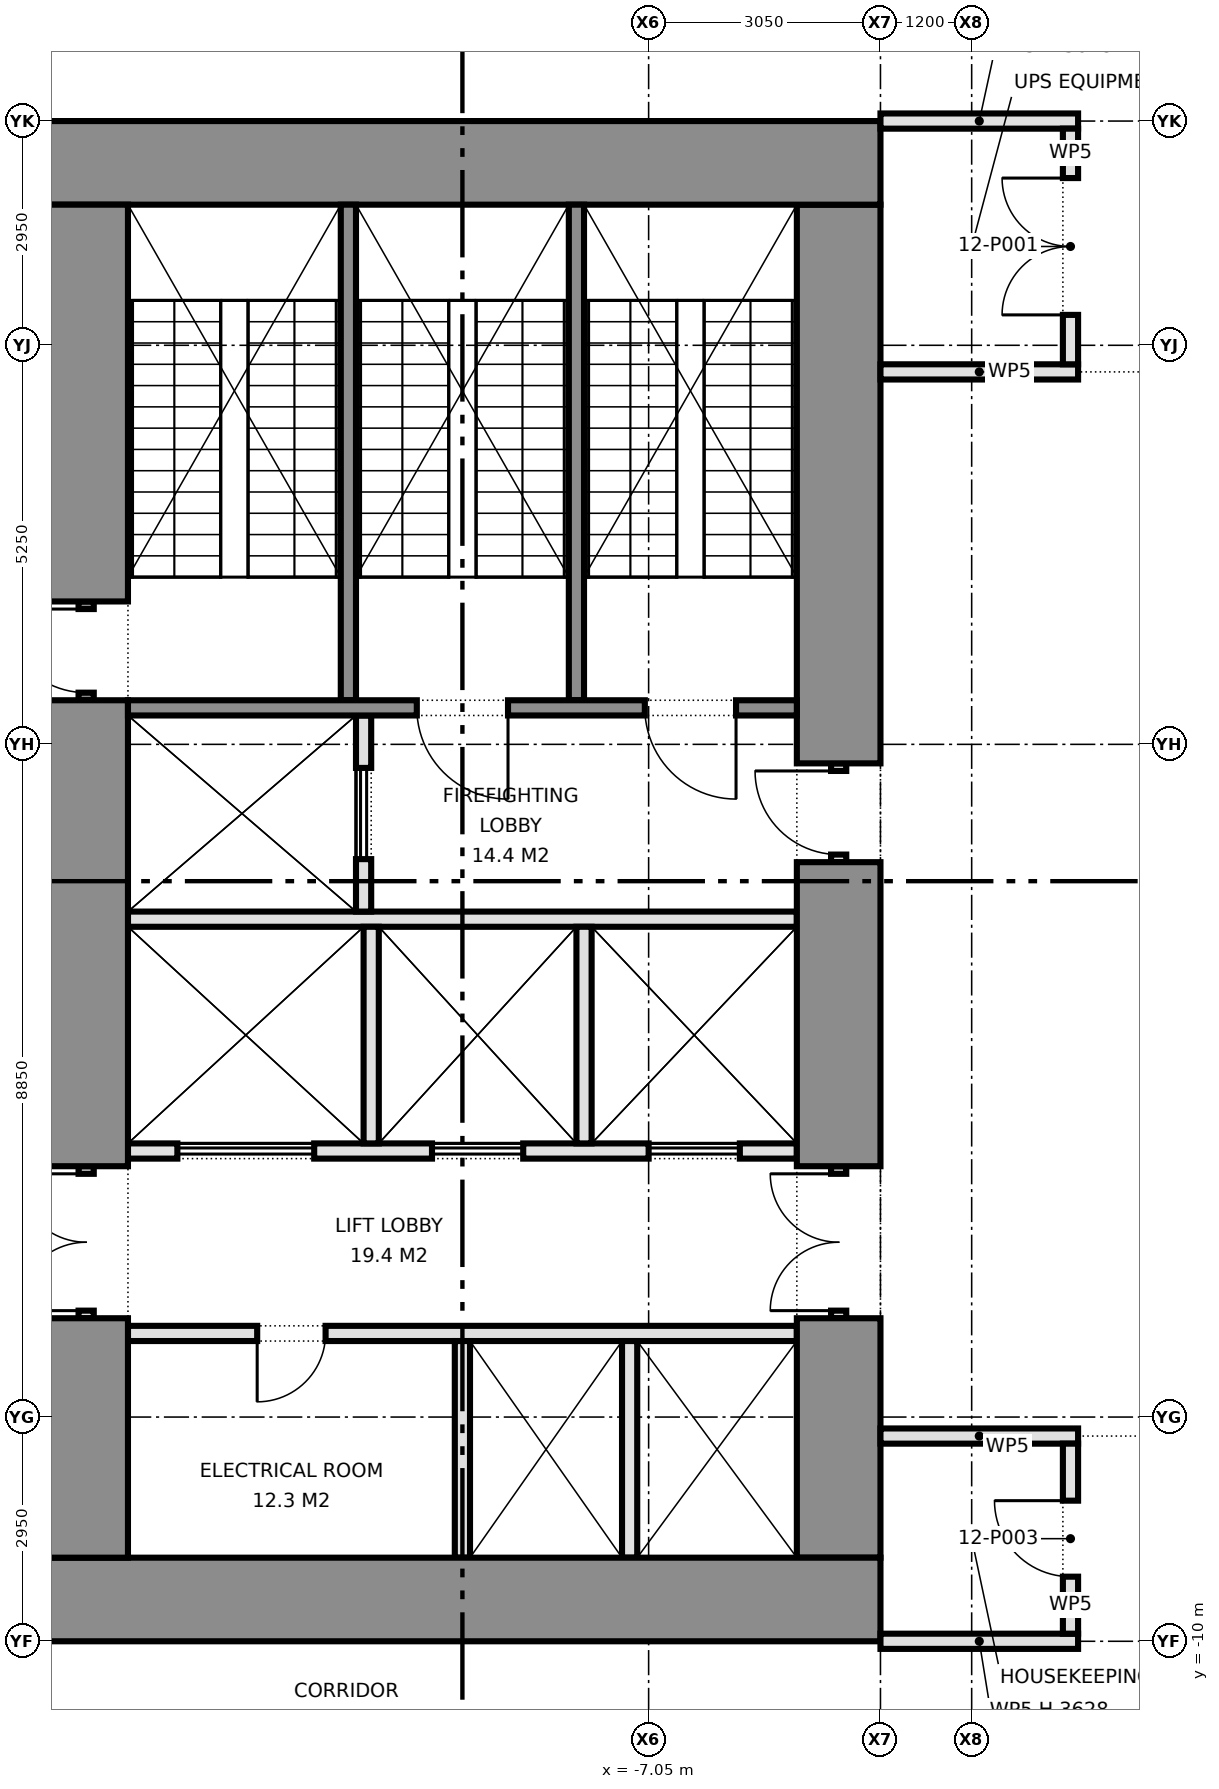
"""IFC4 building model, lengths in metres.
Left out: names, types, materials, properties, quantities, classifications, styles, units other than length and angle.
Written with IfcOpenShell. Run it as: python <this file> out.ifc"""

import sys

from ifc_helpers import new_model, si_unit, direction, frame, frame_2d, origin, place, context, subcontext, project, spatial, rectangle, extrude, element, fill, save


model = new_model("IFC4")
c1 = context("Model", 3, precision=1e-05, world=origin(), true_north=direction((0.0, 1.0)))
c2 = subcontext(c1, "Body", "Model", "MODEL_VIEW")
j1 = project(units=[si_unit("LENGTHUNIT", "METRE"), si_unit("PLANEANGLEUNIT", "RADIAN")], contexts=[c1])
p1 = place(None, origin())
s1 = spatial("IfcSite", under=j1, at=p1, CompositionType="ELEMENT")
p2 = place(p1, origin())
s2 = spatial("IfcBuilding", under=s1, at=p2, CompositionType="ELEMENT")
p3 = place(p2, frame((0.0, 0.0, 54.5)))
s3 = spatial("IfcBuildingStorey", under=s2, at=p3, CompositionType="ELEMENT", Elevation=54.5)
for number, where, z_axis, x_axis in (
    (1, (-15.0, -9.45, 0.0), (0.0, 0.0, 1.0), (1.0, 0.0, 0.0)),
    (2, (-15.0, 9.45, 0.0), (0.0, 0.0, 1.0), (1.0, 0.0, 0.0)),
):
    element("IfcWall", number, at=place(p3, frame(where, z_axis=z_axis, x_axis=x_axis)), inside=s3, PredefinedType="SHEAR", context=c2, shape_type="SweptSolid", body=[
        extrude(rectangle(XDim=11.0, YDim=1.1, at=frame_2d((5.5, 0.0))), origin(), (0.0, 0.0, 1.0), 4.575),
    ])
p4 = place(p3, frame((-14.45, -8.9, 0.0), z_axis=(0.0, 0.0, 1.0), x_axis=(0.0, 1.0, 0.0)))
e3 = element("IfcWall", 3, at=p4, inside=s3, PredefinedType="SHEAR", context=c2, shape_type="SweptSolid", body=[
    extrude(rectangle(XDim=3.15, YDim=1.1, at=frame_2d((1.575, 0.0))), origin(), (0.0, 0.0, 1.0), 4.575),
])
p5 = place(p3, frame((-14.45, -5.75, 0.0), z_axis=(0.0, 0.0, 1.0), x_axis=(0.0, 1.0, 0.0)))
e4 = element("IfcWall", 4, at=p5, inside=s3, PredefinedType="PARTITIONING", context=c2, shape_type="SweptSolid", body=[
    extrude(rectangle(XDim=2.0, YDim=0.2, at=frame_2d((1.0, 0.0))), origin(), (0.0, 0.0, 1.0), 2.4),
])
p6 = place(p5, frame((0.1, 0.0, 0.0)))
e5 = element("IfcOpeningElement", 5, at=p6, cuts=e4, PredefinedType="OPENING", context=c2, shape_type="SweptSolid", body=[
    extrude(rectangle(XDim=1.8, YDim=2.1, at=frame_2d((0.9, 1.05))), frame((0.0, 0.11, 0.0), z_axis=(0.0, -1.0, 0.0), x_axis=(1.0, 0.0, 0.0)), (0.0, 0.0, 1.0), 0.22),
])
p7 = place(p3, frame((-14.45, -3.75, 0.0), z_axis=(0.0, 0.0, 1.0), x_axis=(0.0, 1.0, 0.0)))
e6 = element("IfcWall", 6, at=p7, inside=s3, PredefinedType="SHEAR", context=c2, shape_type="SweptSolid", body=[
    extrude(rectangle(XDim=6.13, YDim=1.1, at=frame_2d((3.065, 0.0))), origin(), (0.0, 0.0, 1.0), 4.575),
])
p8 = place(p3, frame((-14.45, 2.38, 0.0), z_axis=(0.0, 0.0, 1.0), x_axis=(0.0, 1.0, 0.0)))
e7 = element("IfcWall", 7, at=p8, inside=s3, PredefinedType="SHEAR", context=c2, shape_type="SweptSolid", body=[
    extrude(rectangle(XDim=1.3, YDim=0.2, at=frame_2d((0.65, 0.0))), origin(), (0.0, 0.0, 1.0), 2.4),
])
p9 = place(p8, frame((0.1, 0.0, 0.0)))
e8 = element("IfcOpeningElement", 8, at=p9, cuts=e7, PredefinedType="OPENING", context=c2, shape_type="SweptSolid", body=[
    extrude(rectangle(XDim=1.1, YDim=2.1, at=frame_2d((0.55, 1.05))), frame((0.0, 0.11, 0.0), z_axis=(0.0, -1.0, 0.0), x_axis=(1.0, 0.0, 0.0)), (0.0, 0.0, 1.0), 0.22),
])
p10 = place(p3, frame((-14.45, 3.68, 0.0), z_axis=(0.0, 0.0, 1.0), x_axis=(0.0, 1.0, 0.0)))
e9 = element("IfcWall", 9, at=p10, inside=s3, PredefinedType="SHEAR", context=c2, shape_type="SweptSolid", body=[
    extrude(rectangle(XDim=5.22, YDim=1.1, at=frame_2d((2.61, 0.0))), origin(), (0.0, 0.0, 1.0), 4.575),
])
p11 = place(p3, frame((-4.55, -8.9, 0.0), z_axis=(0.0, 0.0, 1.0), x_axis=(0.0, 1.0, 0.0)))
e10 = element("IfcWall", 10, at=p11, inside=s3, PredefinedType="SHEAR", context=c2, shape_type="SweptSolid", body=[
    extrude(rectangle(XDim=3.15, YDim=1.1, at=frame_2d((1.575, 0.0))), origin(), (0.0, 0.0, 1.0), 4.575),
])
p12 = place(p3, frame((-4.55, -5.75, 0.0), z_axis=(0.0, 0.0, 1.0), x_axis=(0.0, 1.0, 0.0)))
e11 = element("IfcWall", 11, at=p12, inside=s3, PredefinedType="PARTITIONING", context=c2, shape_type="SweptSolid", body=[
    extrude(rectangle(XDim=2.0, YDim=0.2, at=frame_2d((1.0, 0.0))), origin(), (0.0, 0.0, 1.0), 2.4),
])
p13 = place(p12, frame((0.1, 0.0, 0.0)))
e12 = element("IfcOpeningElement", 12, at=p13, cuts=e11, PredefinedType="OPENING", context=c2, shape_type="SweptSolid", body=[
    extrude(rectangle(XDim=1.8, YDim=2.1, at=frame_2d((0.9, 1.05))), frame((0.0, 0.11, 0.0), z_axis=(0.0, -1.0, 0.0), x_axis=(1.0, 0.0, 0.0)), (0.0, 0.0, 1.0), 0.22),
])
p14 = place(p3, frame((-4.55, -3.75, 0.0), z_axis=(0.0, 0.0, 1.0), x_axis=(0.0, 1.0, 0.0)))
e13 = element("IfcWall", 13, at=p14, inside=s3, PredefinedType="SHEAR", context=c2, shape_type="SweptSolid", body=[
    extrude(rectangle(XDim=4.0, YDim=1.1, at=frame_2d((2.0, 0.0))), origin(), (0.0, 0.0, 1.0), 4.575),
])
p15 = place(p3, frame((-4.55, 0.25, 0.0), z_axis=(0.0, 0.0, 1.0), x_axis=(0.0, 1.0, 0.0)))
e14 = element("IfcWall", 14, at=p15, inside=s3, PredefinedType="PARTITIONING", context=c2, shape_type="SweptSolid", body=[
    extrude(rectangle(XDim=1.3, YDim=0.2, at=frame_2d((0.65, 0.0))), origin(), (0.0, 0.0, 1.0), 2.4),
])
p16 = place(p15, frame((0.1, 0.0, 0.0)))
e15 = element("IfcOpeningElement", 15, at=p16, cuts=e14, PredefinedType="OPENING", context=c2, shape_type="SweptSolid", body=[
    extrude(rectangle(XDim=1.1, YDim=2.1, at=frame_2d((0.55, 1.05))), frame((0.0, 0.11, 0.0), z_axis=(0.0, -1.0, 0.0), x_axis=(1.0, 0.0, 0.0)), (0.0, 0.0, 1.0), 0.22),
])
p17 = place(p3, frame((-4.55, 1.55, 0.0), z_axis=(0.0, 0.0, 1.0), x_axis=(0.0, 1.0, 0.0)))
e16 = element("IfcWall", 16, at=p17, inside=s3, PredefinedType="SHEAR", context=c2, shape_type="SweptSolid", body=[
    extrude(rectangle(XDim=7.35, YDim=1.1, at=frame_2d((3.675, 0.0))), origin(), (0.0, 0.0, 1.0), 4.575),
])
p18 = place(p3, frame((-13.9, -5.95, 0.0), z_axis=(0.0, 0.0, 1.0), x_axis=(1.0, 0.0, 0.0)))
e17 = element("IfcWall", 17, at=p18, inside=s3, PredefinedType="PARTITIONING", context=c2, shape_type="SweptSolid", body=[
    extrude(rectangle(XDim=8.8, YDim=0.2, at=frame_2d((4.4, 0.0))), origin(), (0.0, 0.0, 1.0), 4.575),
])
p19 = place(p18, frame((1.7, 0.0, 0.0)))
e18 = element("IfcOpeningElement", 18, at=p19, cuts=e17, PredefinedType="OPENING", context=c2, shape_type="SweptSolid", body=[
    extrude(rectangle(XDim=0.9, YDim=2.1, at=frame_2d((0.45, 1.05))), frame((0.0, 0.11, 0.0), z_axis=(0.0, -1.0, 0.0), x_axis=(1.0, 0.0, 0.0)), (0.0, 0.0, 1.0), 0.22),
])
p20 = place(p3, frame((-13.9, -3.55, 0.0), z_axis=(0.0, 0.0, 1.0), x_axis=(1.0, 0.0, 0.0)))
e19 = element("IfcWall", 19, at=p20, inside=s3, PredefinedType="PARTITIONING", context=c2, shape_type="SweptSolid", body=[
    extrude(rectangle(XDim=8.8, YDim=0.2, at=frame_2d((4.4, 0.0))), origin(), (0.0, 0.0, 1.0), 4.575),
])
p21 = place(p20, frame((0.65, 0.0, 0.0)))
e20 = element("IfcOpeningElement", 20, at=p21, cuts=e19, PredefinedType="OPENING", context=c2, shape_type="SweptSolid", body=[
    extrude(rectangle(XDim=1.8, YDim=2.1, at=frame_2d((0.9, 1.05))), frame((0.0, 0.11, 0.0), z_axis=(0.0, -1.0, 0.0), x_axis=(1.0, 0.0, 0.0)), (0.0, 0.0, 1.0), 0.22),
])
p22 = place(p20, frame((4.0, 0.0, 0.0)))
e21 = element("IfcOpeningElement", 21, at=p22, cuts=e19, PredefinedType="OPENING", context=c2, shape_type="SweptSolid", body=[
    extrude(rectangle(XDim=1.2, YDim=2.1, at=frame_2d((0.6, 1.05))), frame((0.0, 0.11, 0.0), z_axis=(0.0, -1.0, 0.0), x_axis=(1.0, 0.0, 0.0)), (0.0, 0.0, 1.0), 0.22),
])
p23 = place(p20, frame((6.85, 0.0, 0.0)))
e22 = element("IfcOpeningElement", 22, at=p23, cuts=e19, PredefinedType="OPENING", context=c2, shape_type="SweptSolid", body=[
    extrude(rectangle(XDim=1.2, YDim=2.1, at=frame_2d((0.6, 1.05))), frame((0.0, 0.11, 0.0), z_axis=(0.0, -1.0, 0.0), x_axis=(1.0, 0.0, 0.0)), (0.0, 0.0, 1.0), 0.22),
])
p24 = place(p3, frame((-13.9, -0.5, 0.0), z_axis=(0.0, 0.0, 1.0), x_axis=(1.0, 0.0, 0.0)))
e23 = element("IfcWall", 23, at=p24, inside=s3, PredefinedType="PARTITIONING", context=c2, shape_type="SweptSolid", body=[
    extrude(rectangle(XDim=8.8, YDim=0.2, at=frame_2d((4.4, 0.0))), origin(), (0.0, 0.0, 1.0), 4.575),
])
p25 = place(p3, frame((-10.8, -0.4, 0.0), z_axis=(0.0, 0.0, 1.0), x_axis=(0.0, 1.0, 0.0)))
e24 = element("IfcWall", 24, at=p25, inside=s3, PredefinedType="PARTITIONING", context=c2, shape_type="SweptSolid", body=[
    extrude(rectangle(XDim=2.58, YDim=0.2, at=frame_2d((1.29, 0.0))), origin(), (0.0, 0.0, 1.0), 4.575),
])
p26 = place(p25, frame((0.69, 0.0, 0.0)))
e25 = element("IfcOpeningElement", 25, at=p26, cuts=e24, PredefinedType="OPENING", context=c2, shape_type="SweptSolid", body=[
    extrude(rectangle(XDim=1.2, YDim=2.1, at=frame_2d((0.6, 1.05))), frame((0.0, 0.11, 0.0), z_axis=(0.0, -1.0, 0.0), x_axis=(1.0, 0.0, 0.0)), (0.0, 0.0, 1.0), 0.22),
])
p27 = place(p3, frame((-13.9, 2.28, 0.0), z_axis=(0.0, 0.0, 1.0), x_axis=(1.0, 0.0, 0.0)))
e26 = element("IfcWall", 26, at=p27, inside=s3, PredefinedType="SHEAR", context=c2, shape_type="SweptSolid", body=[
    extrude(rectangle(XDim=8.8, YDim=0.2, at=frame_2d((4.4, 0.0))), origin(), (0.0, 0.0, 1.0), 4.575),
])
p28 = place(p27, frame((3.8, 0.0, 0.0)))
e27 = element("IfcOpeningElement", 27, at=p28, cuts=e26, PredefinedType="OPENING", context=c2, shape_type="SweptSolid", body=[
    extrude(rectangle(XDim=1.2, YDim=2.1, at=frame_2d((0.6, 1.05))), frame((0.0, 0.11, 0.0), z_axis=(0.0, -1.0, 0.0), x_axis=(1.0, 0.0, 0.0)), (0.0, 0.0, 1.0), 0.22),
])
p29 = place(p27, frame((6.8, 0.0, 0.0)))
e28 = element("IfcOpeningElement", 28, at=p29, cuts=e26, PredefinedType="OPENING", context=c2, shape_type="SweptSolid", body=[
    extrude(rectangle(XDim=1.2, YDim=2.1, at=frame_2d((0.6, 1.05))), frame((0.0, 0.11, 0.0), z_axis=(0.0, -1.0, 0.0), x_axis=(1.0, 0.0, 0.0)), (0.0, 0.0, 1.0), 0.22),
])
for number, where, z_axis, x_axis in (
    (29, (-11.0, 2.38, 0.0), (0.0, 0.0, 1.0), (0.0, 1.0, 0.0)),
    (30, (-8.0, 2.38, 0.0), (0.0, 0.0, 1.0), (0.0, 1.0, 0.0)),
):
    element("IfcWall", number, at=place(p3, frame(where, z_axis=z_axis, x_axis=x_axis)), inside=s3, PredefinedType="SHEAR", context=c2, shape_type="SweptSolid", body=[
        extrude(rectangle(XDim=6.52, YDim=0.2, at=frame_2d((3.26, 0.0))), origin(), (0.0, 0.0, 1.0), 4.575),
    ])
for number, where, z_axis, x_axis in (
    (31, (-9.5, -8.9, 0.0), (0.0, 0.0, 1.0), (0.0, 1.0, 0.0)),
    (32, (-7.3, -8.9, 0.0), (0.0, 0.0, 1.0), (0.0, 1.0, 0.0)),
    (33, (-10.7, -3.45, 0.0), (0.0, 0.0, 1.0), (0.0, 1.0, 0.0)),
    (34, (-7.9, -3.45, 0.0), (0.0, 0.0, 1.0), (0.0, 1.0, 0.0)),
):
    element("IfcWall", number, at=place(p3, frame(where, z_axis=z_axis, x_axis=x_axis)), inside=s3, PredefinedType="PARTITIONING", context=c2, shape_type="SweptSolid", body=[
        extrude(rectangle(XDim=2.85, YDim=0.2, at=frame_2d((1.425, 0.0))), origin(), (0.0, 0.0, 1.0), 4.575),
    ])
p30 = place(p3, frame((-4.0, -10.0, 0.0), z_axis=(0.0, 0.0, 1.0), x_axis=(1.0, 0.0, 0.0)))
e35 = element("IfcWall", 35, at=p30, inside=s3, PredefinedType="PARTITIONING", context=c2, shape_type="SweptSolid", body=[
    extrude(rectangle(XDim=2.6, YDim=0.2, at=frame_2d((1.3, 0.0))), origin(), (0.0, 0.0, 1.0), 3.628),
])
for number, where, z_axis, x_axis in (
    (36, (-4.0, -7.3, 0.0), (0.0, 0.0, 1.0), (1.0, 0.0, 0.0)),
    (37, (-4.0, 6.7, 0.0), (0.0, 0.0, 1.0), (1.0, 0.0, 0.0)),
):
    element("IfcWall", number, at=place(p3, frame(where, z_axis=z_axis, x_axis=x_axis)), inside=s3, PredefinedType="PARTITIONING", context=c2, shape_type="SweptSolid", body=[
        extrude(rectangle(XDim=2.6, YDim=0.2, at=frame_2d((1.3, 0.0))), origin(), (0.0, 0.0, 1.0), 4.575),
    ])
p31 = place(p3, frame((-4.0, 10.0, 0.0), z_axis=(0.0, 0.0, 1.0), x_axis=(1.0, 0.0, 0.0)))
e38 = element("IfcWall", 38, at=p31, inside=s3, PredefinedType="PARTITIONING", context=c2, shape_type="SweptSolid", body=[
    extrude(rectangle(XDim=2.6, YDim=0.2, at=frame_2d((1.3, 0.0))), origin(), (0.0, 0.0, 1.0), 3.628),
])
p32 = place(p3, frame((-1.5, -9.9, 0.0), z_axis=(0.0, 0.0, 1.0), x_axis=(0.0, 1.0, 0.0)))
e39 = element("IfcWall", 39, at=p32, inside=s3, PredefinedType="PARTITIONING", context=c2, shape_type="SweptSolid", body=[
    extrude(rectangle(XDim=2.5, YDim=0.2, at=frame_2d((1.25, 0.0))), origin(), (0.0, 0.0, 1.0), 4.575),
])
p33 = place(p32, frame((0.75, 0.0, 0.0)))
e40 = element("IfcOpeningElement", 40, at=p33, cuts=e39, PredefinedType="OPENING", context=c2, shape_type="SweptSolid", body=[
    extrude(rectangle(XDim=1.0, YDim=2.1, at=frame_2d((0.5, 1.05))), frame((0.0, 0.11, 0.0), z_axis=(0.0, -1.0, 0.0), x_axis=(1.0, 0.0, 0.0)), (0.0, 0.0, 1.0), 0.22),
])
p34 = place(p3, frame((-1.5, 6.8, 0.0), z_axis=(0.0, 0.0, 1.0), x_axis=(0.0, 1.0, 0.0)))
e41 = element("IfcWall", 41, at=p34, inside=s3, PredefinedType="PARTITIONING", context=c2, shape_type="SweptSolid", body=[
    extrude(rectangle(XDim=3.1, YDim=0.2, at=frame_2d((1.55, 0.0))), origin(), (0.0, 0.0, 1.0), 4.575),
])
p35 = place(p34, frame((0.65, 0.0, 0.0)))
e42 = element("IfcOpeningElement", 42, at=p35, cuts=e41, PredefinedType="OPENING", context=c2, shape_type="SweptSolid", body=[
    extrude(rectangle(XDim=1.8, YDim=2.1, at=frame_2d((0.9, 1.05))), frame((0.0, 0.11, 0.0), z_axis=(0.0, -1.0, 0.0), x_axis=(1.0, 0.0, 0.0)), (0.0, 0.0, 1.0), 0.22),
])
p36 = place(p6, origin())
e43 = element("IfcDoor", 43, at=p36, inside=s3, OperationType="DOUBLE_DOOR_SINGLE_SWING", PredefinedType="DOOR", context=c2, shape_type="SweptSolid", body=[
    extrude(rectangle(XDim=1.8, YDim=2.1, at=frame_2d((0.9, 1.05))), frame((0.0, 0.025, 0.0), z_axis=(0.0, -1.0, 0.0), x_axis=(1.0, 0.0, 0.0)), (0.0, 0.0, 1.0), 0.05),
])
fill(e5, e43)
p37 = place(p9, origin())
e44 = element("IfcDoor", 44, at=p37, inside=s3, OperationType="SINGLE_SWING_RIGHT", PredefinedType="DOOR", context=c2, shape_type="SweptSolid", body=[
    extrude(rectangle(XDim=1.1, YDim=2.1, at=frame_2d((0.55, 1.05))), frame((0.0, 0.025, 0.0), z_axis=(0.0, -1.0, 0.0), x_axis=(1.0, 0.0, 0.0)), (0.0, 0.0, 1.0), 0.05),
])
fill(e8, e44)
p38 = place(p13, origin())
e45 = element("IfcDoor", 45, at=p38, inside=s3, OperationType="DOUBLE_DOOR_SINGLE_SWING", PredefinedType="DOOR", context=c2, shape_type="SweptSolid", body=[
    extrude(rectangle(XDim=1.8, YDim=2.1, at=frame_2d((0.9, 1.05))), frame((0.0, 0.025, 0.0), z_axis=(0.0, -1.0, 0.0), x_axis=(1.0, 0.0, 0.0)), (0.0, 0.0, 1.0), 0.05),
])
fill(e12, e45)
p39 = place(p16, origin())
e46 = element("IfcDoor", 46, at=p39, inside=s3, OperationType="SINGLE_SWING_RIGHT", PredefinedType="DOOR", context=c2, shape_type="SweptSolid", body=[
    extrude(rectangle(XDim=1.1, YDim=2.1, at=frame_2d((0.55, 1.05))), frame((0.0, 0.025, 0.0), z_axis=(0.0, -1.0, 0.0), x_axis=(1.0, 0.0, 0.0)), (0.0, 0.0, 1.0), 0.05),
])
fill(e15, e46)
p40 = place(p21, origin())
e47 = element("IfcDoor", 47, at=p40, inside=s3, OperationType="DOUBLE_DOOR_SLIDING", PredefinedType="DOOR", context=c2, shape_type="SweptSolid", body=[
    extrude(rectangle(XDim=1.8, YDim=2.1, at=frame_2d((0.9, 1.05))), frame((0.0, 0.025, 0.0), z_axis=(0.0, -1.0, 0.0), x_axis=(1.0, 0.0, 0.0)), (0.0, 0.0, 1.0), 0.05),
])
fill(e20, e47)
p41 = place(p22, origin())
e48 = element("IfcDoor", 48, at=p41, inside=s3, OperationType="DOUBLE_DOOR_SLIDING", PredefinedType="DOOR", context=c2, shape_type="SweptSolid", body=[
    extrude(rectangle(XDim=1.2, YDim=2.1, at=frame_2d((0.6, 1.05))), frame((0.0, 0.025, 0.0), z_axis=(0.0, -1.0, 0.0), x_axis=(1.0, 0.0, 0.0)), (0.0, 0.0, 1.0), 0.05),
])
fill(e21, e48)
p42 = place(p23, origin())
e49 = element("IfcDoor", 49, at=p42, inside=s3, OperationType="DOUBLE_DOOR_SLIDING", PredefinedType="DOOR", context=c2, shape_type="SweptSolid", body=[
    extrude(rectangle(XDim=1.2, YDim=2.1, at=frame_2d((0.6, 1.05))), frame((0.0, 0.025, 0.0), z_axis=(0.0, -1.0, 0.0), x_axis=(1.0, 0.0, 0.0)), (0.0, 0.0, 1.0), 0.05),
])
fill(e22, e49)
p43 = place(p26, origin())
e50 = element("IfcDoor", 50, at=p43, inside=s3, OperationType="DOUBLE_DOOR_SLIDING", PredefinedType="DOOR", context=c2, shape_type="SweptSolid", body=[
    extrude(rectangle(XDim=1.2, YDim=2.1, at=frame_2d((0.6, 1.05))), frame((0.0, 0.025, 0.0), z_axis=(0.0, -1.0, 0.0), x_axis=(1.0, 0.0, 0.0)), (0.0, 0.0, 1.0), 0.05),
])
fill(e25, e50)
p44 = place(p19, frame((0.9, 0.0, 0.0), z_axis=(0.0, 0.0, 1.0), x_axis=(-1.0, 0.0, 0.0)))
e51 = element("IfcDoor", 51, at=p44, inside=s3, OperationType="SINGLE_SWING_RIGHT", PredefinedType="DOOR", context=c2, shape_type="SweptSolid", body=[
    extrude(rectangle(XDim=0.9, YDim=2.1, at=frame_2d((0.45, 1.05))), frame((0.0, 0.025, 0.0), z_axis=(0.0, -1.0, 0.0), x_axis=(1.0, 0.0, 0.0)), (0.0, 0.0, 1.0), 0.05),
])
fill(e18, e51)
p45 = place(p28, frame((1.2, 0.0, 0.0), z_axis=(0.0, 0.0, 1.0), x_axis=(-1.0, 0.0, 0.0)))
e52 = element("IfcDoor", 52, at=p45, inside=s3, OperationType="SINGLE_SWING_LEFT", PredefinedType="DOOR", context=c2, shape_type="SweptSolid", body=[
    extrude(rectangle(XDim=1.2, YDim=2.1, at=frame_2d((0.6, 1.05))), frame((0.0, 0.025, 0.0), z_axis=(0.0, -1.0, 0.0), x_axis=(1.0, 0.0, 0.0)), (0.0, 0.0, 1.0), 0.05),
])
fill(e27, e52)
p46 = place(p29, frame((1.2, 0.0, 0.0), z_axis=(0.0, 0.0, 1.0), x_axis=(-1.0, 0.0, 0.0)))
e53 = element("IfcDoor", 53, at=p46, inside=s3, OperationType="SINGLE_SWING_LEFT", PredefinedType="DOOR", context=c2, shape_type="SweptSolid", body=[
    extrude(rectangle(XDim=1.2, YDim=2.1, at=frame_2d((0.6, 1.05))), frame((0.0, 0.025, 0.0), z_axis=(0.0, -1.0, 0.0), x_axis=(1.0, 0.0, 0.0)), (0.0, 0.0, 1.0), 0.05),
])
fill(e28, e53)
p47 = place(p35, origin())
e54 = element("IfcDoor", 54, at=p47, inside=s3, OperationType="DOUBLE_DOOR_SINGLE_SWING", PredefinedType="DOOR", context=c2, shape_type="SweptSolid", body=[
    extrude(rectangle(XDim=1.8, YDim=2.1, at=frame_2d((0.9, 1.05))), frame((0.0, 0.025, 0.0), z_axis=(0.0, -1.0, 0.0), x_axis=(1.0, 0.0, 0.0)), (0.0, 0.0, 1.0), 0.05),
])
fill(e42, e54)
p48 = place(p33, origin())
e55 = element("IfcDoor", 55, at=p48, inside=s3, OperationType="SINGLE_SWING_RIGHT", PredefinedType="DOOR", context=c2, shape_type="SweptSolid", body=[
    extrude(rectangle(XDim=1.0, YDim=2.1, at=frame_2d((0.5, 1.05))), frame((0.0, 0.025, 0.0), z_axis=(0.0, -1.0, 0.0), x_axis=(1.0, 0.0, 0.0)), (0.0, 0.0, 1.0), 0.05),
])
fill(e40, e55)
save(model, sys.argv[1])
